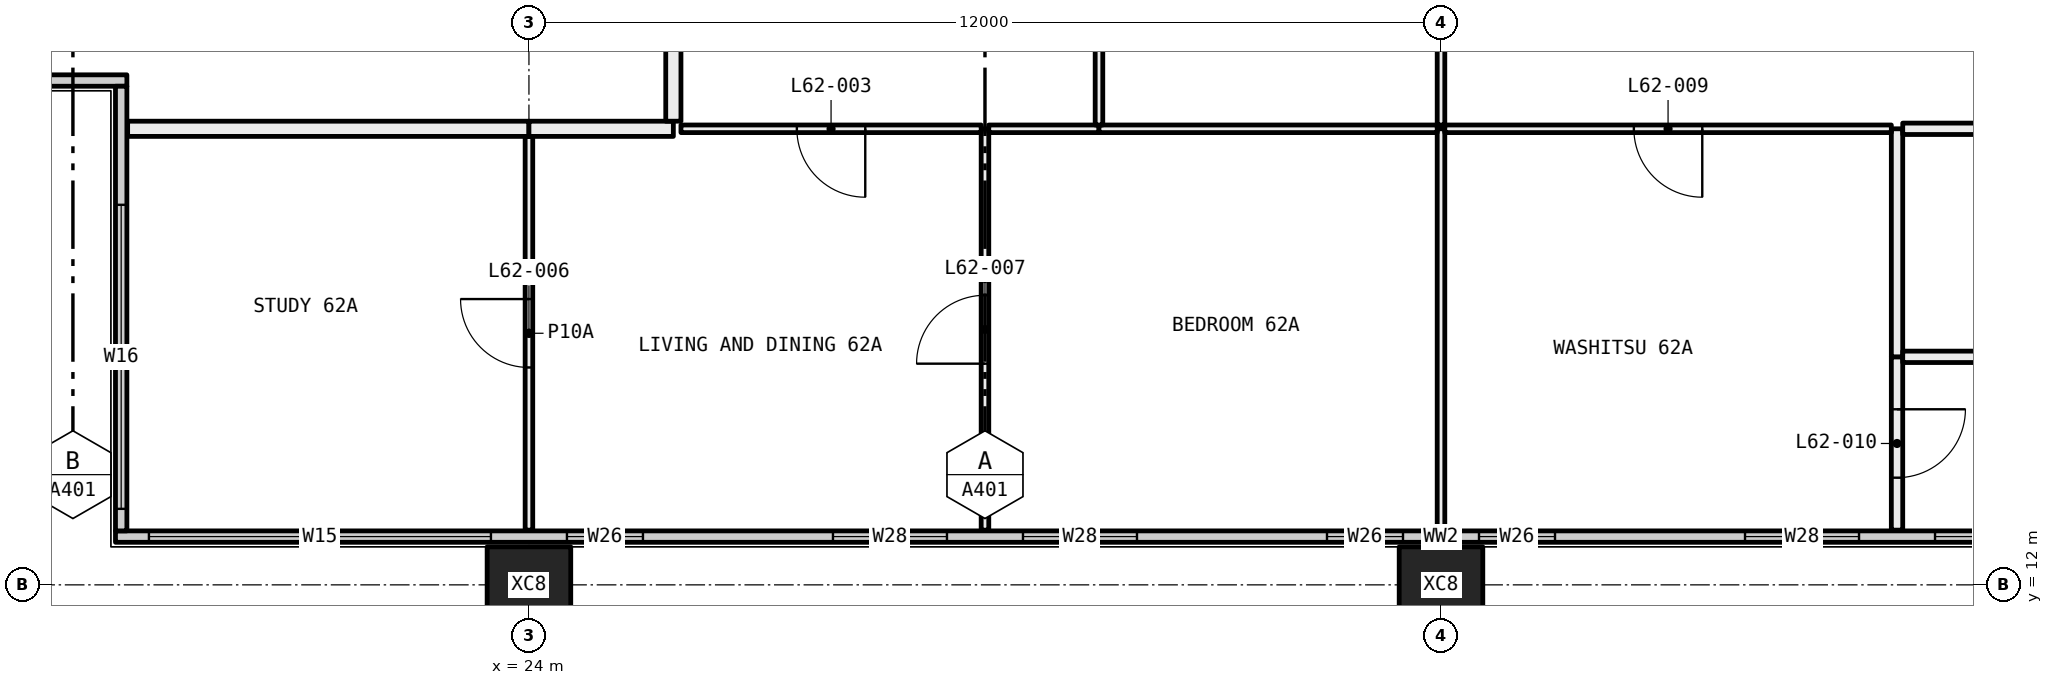
"""IFC4 building model, lengths in metres.
Left out: names, types, materials, properties, quantities, classifications, styles, units other than length and angle.
Written with IfcOpenShell. Run it as: python <this file> out.ifc"""

import sys

from ifc_helpers import new_model, si_unit, direction, frame, frame_2d, origin, origin_2d, place, context, subcontext, project, spatial, rectangle, hollow_rectangle, extrude, element, fill, save


model = new_model("IFC4")
c1 = context("Model", 3, precision=1e-05, world=origin(), true_north=direction((0.0, 1.0)))
c2 = subcontext(c1, "Body", "Model", "MODEL_VIEW")
j1 = project(units=[si_unit("LENGTHUNIT", "METRE"), si_unit("PLANEANGLEUNIT", "RADIAN")], contexts=[c1])
p1 = place(None, origin())
s1 = spatial("IfcSite", under=j1, at=p1, CompositionType="ELEMENT")
p2 = place(p1, origin())
s2 = spatial("IfcBuilding", under=s1, at=p2, CompositionType="ELEMENT")
p3 = place(p2, frame((0.0, 0.0, 231.75)))
s3 = spatial("IfcBuildingStorey", under=s2, at=p3, CompositionType="ELEMENT", Elevation=231.75)
for number, where, z_axis, x_axis in (
    (1, (24.0, 12.0, -0.4), (0.0, 0.0, 1.0), (1.0, 0.0, 0.0)),
    (2, (36.0, 12.0, -0.4), (0.0, 0.0, 1.0), (1.0, 0.0, 0.0)),
):
    element("IfcColumn", number, at=place(p3, frame(where, z_axis=z_axis, x_axis=x_axis)), inside=s3, PredefinedType="COLUMN", context=c2, shape_type="SweptSolid", body=[
        extrude(hollow_rectangle(XDim=1.1, YDim=1.0, WallThickness=0.04, at=origin_2d()), origin(), (0.0, 0.0, 1.0), 3.45),
    ])
p4 = place(p3, frame((18.56, 12.635, 0.0), z_axis=(0.0, 0.0, 1.0), x_axis=(1.0, 0.0, 0.0)))
e3 = element("IfcWall", 3, at=p4, inside=s3, PredefinedType="ELEMENTEDWALL", context=c2, shape_type="SweptSolid", body=[
    extrude(rectangle(XDim=34.88, YDim=0.15, at=frame_2d((17.44, 0.0))), origin(), (0.0, 0.0, 1.0), 3.05),
])
p5 = place(p4, frame((0.44, 0.0, 0.45)))
e4 = element("IfcOpeningElement", 4, at=p5, cuts=e3, PredefinedType="OPENING", context=c2, shape_type="SweptSolid", body=[
    extrude(rectangle(XDim=4.5, YDim=2.55, at=frame_2d((2.25, 1.275))), frame((0.0, 0.085, 0.0), z_axis=(0.0, -1.0, 0.0), x_axis=(1.0, 0.0, 0.0)), (0.0, 0.0, 1.0), 0.17),
])
p6 = place(p4, frame((5.94, 0.0, 0.45)))
e5 = element("IfcOpeningElement", 5, at=p6, cuts=e3, PredefinedType="OPENING", context=c2, shape_type="SweptSolid", body=[
    extrude(rectangle(XDim=1.0, YDim=2.55, at=frame_2d((0.5, 1.275))), frame((0.0, 0.085, 0.0), z_axis=(0.0, -1.0, 0.0), x_axis=(1.0, 0.0, 0.0)), (0.0, 0.0, 1.0), 0.17),
])
p7 = place(p4, frame((9.44, 0.0, 0.45)))
e6 = element("IfcOpeningElement", 6, at=p7, cuts=e3, PredefinedType="OPENING", context=c2, shape_type="SweptSolid", body=[
    extrude(rectangle(XDim=1.5, YDim=2.55, at=frame_2d((0.75, 1.275))), frame((0.0, 0.085, 0.0), z_axis=(0.0, -1.0, 0.0), x_axis=(1.0, 0.0, 0.0)), (0.0, 0.0, 1.0), 0.17),
])
p8 = place(p4, frame((11.94, 0.0, 0.45)))
e7 = element("IfcOpeningElement", 7, at=p8, cuts=e3, PredefinedType="OPENING", context=c2, shape_type="SweptSolid", body=[
    extrude(rectangle(XDim=1.5, YDim=2.55, at=frame_2d((0.75, 1.275))), frame((0.0, 0.085, 0.0), z_axis=(0.0, -1.0, 0.0), x_axis=(1.0, 0.0, 0.0)), (0.0, 0.0, 1.0), 0.17),
])
p9 = place(p4, frame((15.94, 0.0, 0.45)))
e8 = element("IfcOpeningElement", 8, at=p9, cuts=e3, PredefinedType="OPENING", context=c2, shape_type="SweptSolid", body=[
    extrude(rectangle(XDim=1.0, YDim=2.55, at=frame_2d((0.5, 1.275))), frame((0.0, 0.085, 0.0), z_axis=(0.0, -1.0, 0.0), x_axis=(1.0, 0.0, 0.0)), (0.0, 0.0, 1.0), 0.17),
])
p10 = place(p4, frame((17.94, 0.0, 0.45)))
e9 = element("IfcOpeningElement", 9, at=p10, cuts=e3, PredefinedType="OPENING", context=c2, shape_type="SweptSolid", body=[
    extrude(rectangle(XDim=1.0, YDim=2.55, at=frame_2d((0.5, 1.275))), frame((0.0, 0.085, 0.0), z_axis=(0.0, -1.0, 0.0), x_axis=(1.0, 0.0, 0.0)), (0.0, 0.0, 1.0), 0.17),
])
p11 = place(p4, frame((21.44, 0.0, 0.45)))
e10 = element("IfcOpeningElement", 10, at=p11, cuts=e3, PredefinedType="OPENING", context=c2, shape_type="SweptSolid", body=[
    extrude(rectangle(XDim=1.5, YDim=2.55, at=frame_2d((0.75, 1.275))), frame((0.0, 0.085, 0.0), z_axis=(0.0, -1.0, 0.0), x_axis=(1.0, 0.0, 0.0)), (0.0, 0.0, 1.0), 0.17),
])
p12 = place(p4, frame((23.94, 0.0, 0.45)))
e11 = element("IfcOpeningElement", 11, at=p12, cuts=e3, PredefinedType="OPENING", context=c2, shape_type="SweptSolid", body=[
    extrude(rectangle(XDim=1.5, YDim=2.55, at=frame_2d((0.75, 1.275))), frame((0.0, 0.085, 0.0), z_axis=(0.0, -1.0, 0.0), x_axis=(1.0, 0.0, 0.0)), (0.0, 0.0, 1.0), 0.17),
])
p13 = place(p4, frame((27.94, 0.0, 0.45)))
e12 = element("IfcOpeningElement", 12, at=p13, cuts=e3, PredefinedType="OPENING", context=c2, shape_type="SweptSolid", body=[
    extrude(rectangle(XDim=1.0, YDim=2.55, at=frame_2d((0.5, 1.275))), frame((0.0, 0.085, 0.0), z_axis=(0.0, -1.0, 0.0), x_axis=(1.0, 0.0, 0.0)), (0.0, 0.0, 1.0), 0.17),
])
p14 = place(p4, frame((29.94, 0.0, 0.45)))
e13 = element("IfcOpeningElement", 13, at=p14, cuts=e3, PredefinedType="OPENING", context=c2, shape_type="SweptSolid", body=[
    extrude(rectangle(XDim=4.5, YDim=2.55, at=frame_2d((2.25, 1.275))), frame((0.0, 0.085, 0.0), z_axis=(0.0, -1.0, 0.0), x_axis=(1.0, 0.0, 0.0)), (0.0, 0.0, 1.0), 0.17),
])
p15 = place(p3, frame((12.56, 18.635, 0.0), z_axis=(0.0, 0.0, 1.0), x_axis=(1.0, 0.0, 0.0)))
e14 = element("IfcWall", 14, at=p15, inside=s3, PredefinedType="ELEMENTEDWALL", context=c2, shape_type="SweptSolid", body=[
    extrude(rectangle(XDim=6.15, YDim=0.15, at=frame_2d((3.075, 0.0))), origin(), (0.0, 0.0, 1.0), 3.05),
])
p16 = place(p15, frame((0.44, 0.0, 0.45)))
e15 = element("IfcOpeningElement", 15, at=p16, cuts=e14, PredefinedType="OPENING", context=c2, shape_type="SweptSolid", body=[
    extrude(rectangle(XDim=4.0, YDim=2.55, at=frame_2d((2.0, 1.275))), frame((0.0, 0.085, 0.0), z_axis=(0.0, -1.0, 0.0), x_axis=(1.0, 0.0, 0.0)), (0.0, 0.0, 1.0), 0.17),
])
p17 = place(p3, frame((18.635, 12.71, 0.0), z_axis=(0.0, 0.0, 1.0), x_axis=(0.0, 1.0, 0.0)))
e16 = element("IfcWall", 16, at=p17, inside=s3, PredefinedType="ELEMENTEDWALL", context=c2, shape_type="SweptSolid", body=[
    extrude(rectangle(XDim=5.85, YDim=0.15, at=frame_2d((2.925, 0.0))), origin(), (0.0, 0.0, 1.0), 3.05),
])
p18 = place(p17, frame((0.29, 0.0, 0.45)))
e17 = element("IfcOpeningElement", 17, at=p18, cuts=e16, PredefinedType="OPENING", context=c2, shape_type="SweptSolid", body=[
    extrude(rectangle(XDim=4.0, YDim=2.55, at=frame_2d((2.0, 1.275))), frame((0.0, 0.085, 0.0), z_axis=(0.0, -1.0, 0.0), x_axis=(1.0, 0.0, 0.0)), (0.0, 0.0, 1.0), 0.17),
])
p19 = place(p3, frame((24.0, 12.72, 0.0), z_axis=(0.0, 0.0, 1.0), x_axis=(0.0, 1.0, 0.0)))
e18 = element("IfcWall", 18, at=p19, inside=s3, PredefinedType="PARTITIONING", context=c2, shape_type="SweptSolid", body=[
    extrude(rectangle(XDim=5.18, YDim=0.1, at=frame_2d((2.59, 0.0))), origin(), (0.0, 0.0, 1.0), 3.05),
])
p20 = place(p19, frame((2.14, 0.0, 0.0)))
e19 = element("IfcOpeningElement", 19, at=p20, cuts=e18, PredefinedType="OPENING", context=c2, shape_type="SweptSolid", body=[
    extrude(rectangle(XDim=0.9, YDim=2.1, at=frame_2d((0.45, 1.05))), frame((0.0, 0.06, 0.0), z_axis=(0.0, -1.0, 0.0), x_axis=(1.0, 0.0, 0.0)), (0.0, 0.0, 1.0), 0.12),
])
p21 = place(p3, frame((24.0, 18.0, 0.0), z_axis=(0.0, 0.0, 1.0), x_axis=(-1.0, 0.0, 0.0)))
e20 = element("IfcWall", 20, at=p21, inside=s3, PredefinedType="PARTITIONING", context=c2, shape_type="SweptSolid", body=[
    extrude(rectangle(XDim=5.28, YDim=0.2, at=frame_2d((2.64, 0.0))), origin(), (0.0, 0.0, 1.0), 3.05),
])
p22 = place(p3, frame((30.0, 12.72, 0.0), z_axis=(0.0, 0.0, 1.0), x_axis=(0.0, 1.0, 0.0)))
e21 = element("IfcWall", 21, at=p22, inside=s3, PredefinedType="PARTITIONING", context=c2, shape_type="SweptSolid", body=[
    extrude(rectangle(XDim=5.28, YDim=0.1, at=frame_2d((2.64, 0.0))), origin(), (0.0, 0.0, 1.0), 3.05),
])
p23 = place(p22, frame((2.19, 0.0, 0.0)))
e22 = element("IfcOpeningElement", 22, at=p23, cuts=e21, PredefinedType="OPENING", context=c2, shape_type="SweptSolid", body=[
    extrude(rectangle(XDim=0.9, YDim=2.1, at=frame_2d((0.45, 1.05))), frame((0.0, 0.06, 0.0), z_axis=(0.0, -1.0, 0.0), x_axis=(1.0, 0.0, 0.0)), (0.0, 0.0, 1.0), 0.12),
])
p24 = place(p3, frame((29.95, 18.0, 0.0), z_axis=(0.0, 0.0, 1.0), x_axis=(-1.0, 0.0, 0.0)))
e23 = element("IfcWall", 23, at=p24, inside=s3, PredefinedType="PARTITIONING", context=c2, shape_type="SweptSolid", body=[
    extrude(rectangle(XDim=3.95, YDim=0.1, at=frame_2d((1.975, 0.0))), origin(), (0.0, 0.0, 1.0), 3.05),
])
p25 = place(p24, frame((1.525, 0.0, 0.0)))
e24 = element("IfcOpeningElement", 24, at=p25, cuts=e23, PredefinedType="OPENING", context=c2, shape_type="SweptSolid", body=[
    extrude(rectangle(XDim=0.9, YDim=2.1, at=frame_2d((0.45, 1.05))), frame((0.0, 0.06, 0.0), z_axis=(0.0, -1.0, 0.0), x_axis=(1.0, 0.0, 0.0)), (0.0, 0.0, 1.0), 0.12),
])
p26 = place(p3, frame((25.9, 18.0, 0.0), z_axis=(0.0, 0.0, 1.0), x_axis=(-1.0, 0.0, 0.0)))
e25 = element("IfcWall", 25, at=p26, inside=s3, PredefinedType="PARTITIONING", context=c2, shape_type="SweptSolid", body=[
    extrude(rectangle(XDim=1.9, YDim=0.2, at=frame_2d((0.95, 0.0))), origin(), (0.0, 0.0, 1.0), 3.05),
])
p27 = place(p3, frame((36.0, 12.72, 0.0), z_axis=(0.0, 0.0, 1.0), x_axis=(0.0, 1.0, 0.0)))
e26 = element("IfcWall", 26, at=p27, inside=s3, PredefinedType="PARTITIONING", context=c2, shape_type="SweptSolid", body=[
    extrude(rectangle(XDim=5.28, YDim=0.1, at=frame_2d((2.64, 0.0))), origin(), (0.0, 0.0, 1.0), 2.45),
])
p28 = place(p3, frame((31.5, 18.0, 0.0), z_axis=(0.0, 0.0, 1.0), x_axis=(-1.0, 0.0, 0.0)))
e27 = element("IfcWall", 27, at=p28, inside=s3, PredefinedType="PARTITIONING", context=c2, shape_type="SweptSolid", body=[
    extrude(rectangle(XDim=1.45, YDim=0.1, at=frame_2d((0.725, 0.0))), origin(), (0.0, 0.0, 1.0), 3.05),
])
p29 = place(p3, frame((35.95, 18.0, 0.0), z_axis=(0.0, 0.0, 1.0), x_axis=(-1.0, 0.0, 0.0)))
e28 = element("IfcWall", 28, at=p29, inside=s3, PredefinedType="PARTITIONING", context=c2, shape_type="SweptSolid", body=[
    extrude(rectangle(XDim=4.45, YDim=0.1, at=frame_2d((2.225, 0.0))), origin(), (0.0, 0.0, 1.0), 2.45),
])
p30 = place(p3, frame((42.0, 12.72, 0.0), z_axis=(0.0, 0.0, 1.0), x_axis=(0.0, 1.0, 0.0)))
e29 = element("IfcWall", 29, at=p30, inside=s3, PredefinedType="PARTITIONING", context=c2, shape_type="SweptSolid", body=[
    extrude(rectangle(XDim=2.28, YDim=0.15, at=frame_2d((1.14, 0.0))), origin(), (0.0, 0.0, 1.0), 3.05),
])
p31 = place(p30, frame((0.69, 0.0, 0.0)))
e30 = element("IfcOpeningElement", 30, at=p31, cuts=e29, PredefinedType="OPENING", context=c2, shape_type="SweptSolid", body=[
    extrude(rectangle(XDim=0.9, YDim=2.1, at=frame_2d((0.45, 1.05))), frame((0.0, 0.085, 0.0), z_axis=(0.0, -1.0, 0.0), x_axis=(1.0, 0.0, 0.0)), (0.0, 0.0, 1.0), 0.17),
])
p32 = place(p3, frame((42.0, 15.0, 0.0), z_axis=(0.0, 0.0, 1.0), x_axis=(0.0, 1.0, 0.0)))
e31 = element("IfcWall", 31, at=p32, inside=s3, PredefinedType="PARTITIONING", context=c2, shape_type="SweptSolid", body=[
    extrude(rectangle(XDim=3.0, YDim=0.15, at=frame_2d((1.5, 0.0))), origin(), (0.0, 0.0, 1.0), 3.05),
])
p33 = place(p3, frame((41.925, 18.0, 0.0), z_axis=(0.0, 0.0, 1.0), x_axis=(-1.0, 0.0, 0.0)))
e32 = element("IfcWall", 32, at=p33, inside=s3, PredefinedType="PARTITIONING", context=c2, shape_type="SweptSolid", body=[
    extrude(rectangle(XDim=5.875, YDim=0.1, at=frame_2d((2.938, 0.0))), origin(), (0.0, 0.0, 1.0), 2.45),
])
p34 = place(p33, frame((2.488, 0.0, 0.0)))
e33 = element("IfcOpeningElement", 33, at=p34, cuts=e32, PredefinedType="OPENING", context=c2, shape_type="SweptSolid", body=[
    extrude(rectangle(XDim=0.9, YDim=2.1, at=frame_2d((0.45, 1.05))), frame((0.0, 0.06, 0.0), z_axis=(0.0, -1.0, 0.0), x_axis=(1.0, 0.0, 0.0)), (0.0, 0.0, 1.0), 0.12),
])
p35 = place(p3, frame((47.9, 15.0, 0.0), z_axis=(0.0, 0.0, 1.0), x_axis=(-1.0, 0.0, 0.0)))
e34 = element("IfcWall", 34, at=p35, inside=s3, PredefinedType="PARTITIONING", context=c2, shape_type="SweptSolid", body=[
    extrude(rectangle(XDim=5.825, YDim=0.15, at=frame_2d((2.913, 0.0))), origin(), (0.0, 0.0, 1.0), 3.05),
])
p36 = place(p3, frame((46.0, 18.0, 0.0), z_axis=(0.0, 0.0, 1.0), x_axis=(-1.0, 0.0, 0.0)))
e35 = element("IfcWall", 35, at=p36, inside=s3, PredefinedType="PARTITIONING", context=c2, shape_type="SweptSolid", body=[
    extrude(rectangle(XDim=3.925, YDim=0.15, at=frame_2d((1.962, 0.0))), origin(), (0.0, 0.0, 1.0), 3.05),
])
p37 = place(p36, frame((1.512, 0.0, 0.0)))
e36 = element("IfcOpeningElement", 36, at=p37, cuts=e35, PredefinedType="OPENING", context=c2, shape_type="SweptSolid", body=[
    extrude(rectangle(XDim=0.9, YDim=2.1, at=frame_2d((0.45, 1.05))), frame((0.0, 0.085, 0.0), z_axis=(0.0, -1.0, 0.0), x_axis=(1.0, 0.0, 0.0)), (0.0, 0.0, 1.0), 0.17),
])
p38 = place(p3, frame((31.5, 18.05, 0.0), z_axis=(0.0, 0.0, 1.0), x_axis=(0.0, 1.0, 0.0)))
e37 = element("IfcWall", 37, at=p38, inside=s3, PredefinedType="PARTITIONING", context=c2, shape_type="SweptSolid", body=[
    extrude(rectangle(XDim=6.175, YDim=0.1, at=frame_2d((3.087, 0.0))), origin(), (0.0, 0.0, 1.0), 2.45),
])
p39 = place(p38, frame((2.637, 0.0, 0.0)))
e38 = element("IfcOpeningElement", 38, at=p39, cuts=e37, PredefinedType="OPENING", context=c2, shape_type="SweptSolid", body=[
    extrude(rectangle(XDim=0.9, YDim=2.1, at=frame_2d((0.45, 1.05))), frame((0.0, 0.06, 0.0), z_axis=(0.0, -1.0, 0.0), x_axis=(1.0, 0.0, 0.0)), (0.0, 0.0, 1.0), 0.12),
])
p40 = place(p3, frame((25.9, 23.9, 0.0), z_axis=(0.0, 0.0, 1.0), x_axis=(0.0, -1.0, 0.0)))
e39 = element("IfcWall", 39, at=p40, inside=s3, PredefinedType="PARTITIONING", context=c2, shape_type="SweptSolid", body=[
    extrude(rectangle(XDim=5.8, YDim=0.2, at=frame_2d((2.9, 0.0))), origin(), (0.0, 0.0, 1.0), 3.05),
])
p41 = place(p3, frame((36.0, 18.05, 0.0), z_axis=(0.0, 0.0, 1.0), x_axis=(0.0, 1.0, 0.0)))
e40 = element("IfcWall", 40, at=p41, inside=s3, PredefinedType="PARTITIONING", context=c2, shape_type="SweptSolid", body=[
    extrude(rectangle(XDim=5.4, YDim=0.1, at=frame_2d((2.7, 0.0))), origin(), (0.0, 0.0, 1.0), 2.45),
])
p42 = place(p41, frame((2.25, 0.0, 0.0)))
e41 = element("IfcOpeningElement", 41, at=p42, cuts=e40, PredefinedType="OPENING", context=c2, shape_type="SweptSolid", body=[
    extrude(rectangle(XDim=0.9, YDim=2.1, at=frame_2d((0.45, 1.05))), frame((0.0, 0.06, 0.0), z_axis=(0.0, -1.0, 0.0), x_axis=(1.0, 0.0, 0.0)), (0.0, 0.0, 1.0), 0.12),
])
p43 = place(p5, origin())
e42 = element("IfcWindow", 42, at=p43, inside=s3, PartitioningType="SINGLE_PANEL", PredefinedType="WINDOW", context=c2, shape_type="SweptSolid", body=[
    extrude(rectangle(XDim=4.5, YDim=2.55, at=frame_2d((2.25, 1.275))), frame((0.0, 0.03, 0.0), z_axis=(0.0, -1.0, 0.0), x_axis=(1.0, 0.0, 0.0)), (0.0, 0.0, 1.0), 0.06),
])
fill(e4, e42)
p44 = place(p6, origin())
e43 = element("IfcWindow", 43, at=p44, inside=s3, PartitioningType="SINGLE_PANEL", PredefinedType="WINDOW", context=c2, shape_type="SweptSolid", body=[
    extrude(rectangle(XDim=1.0, YDim=2.55, at=frame_2d((0.5, 1.275))), frame((0.0, 0.03, 0.0), z_axis=(0.0, -1.0, 0.0), x_axis=(1.0, 0.0, 0.0)), (0.0, 0.0, 1.0), 0.06),
])
fill(e5, e43)
p45 = place(p7, origin())
e44 = element("IfcWindow", 44, at=p45, inside=s3, PartitioningType="SINGLE_PANEL", PredefinedType="WINDOW", context=c2, shape_type="SweptSolid", body=[
    extrude(rectangle(XDim=1.5, YDim=2.55, at=frame_2d((0.75, 1.275))), frame((0.0, 0.03, 0.0), z_axis=(0.0, -1.0, 0.0), x_axis=(1.0, 0.0, 0.0)), (0.0, 0.0, 1.0), 0.06),
])
fill(e6, e44)
p46 = place(p8, origin())
e45 = element("IfcWindow", 45, at=p46, inside=s3, PartitioningType="SINGLE_PANEL", PredefinedType="WINDOW", context=c2, shape_type="SweptSolid", body=[
    extrude(rectangle(XDim=1.5, YDim=2.55, at=frame_2d((0.75, 1.275))), frame((0.0, 0.03, 0.0), z_axis=(0.0, -1.0, 0.0), x_axis=(1.0, 0.0, 0.0)), (0.0, 0.0, 1.0), 0.06),
])
fill(e7, e45)
p47 = place(p9, origin())
e46 = element("IfcWindow", 46, at=p47, inside=s3, PartitioningType="SINGLE_PANEL", PredefinedType="WINDOW", context=c2, shape_type="SweptSolid", body=[
    extrude(rectangle(XDim=1.0, YDim=2.55, at=frame_2d((0.5, 1.275))), frame((0.0, 0.03, 0.0), z_axis=(0.0, -1.0, 0.0), x_axis=(1.0, 0.0, 0.0)), (0.0, 0.0, 1.0), 0.06),
])
fill(e8, e46)
p48 = place(p10, origin())
e47 = element("IfcWindow", 47, at=p48, inside=s3, PartitioningType="SINGLE_PANEL", PredefinedType="WINDOW", context=c2, shape_type="SweptSolid", body=[
    extrude(rectangle(XDim=1.0, YDim=2.55, at=frame_2d((0.5, 1.275))), frame((0.0, 0.03, 0.0), z_axis=(0.0, -1.0, 0.0), x_axis=(1.0, 0.0, 0.0)), (0.0, 0.0, 1.0), 0.06),
])
fill(e9, e47)
p49 = place(p11, origin())
e48 = element("IfcWindow", 48, at=p49, inside=s3, PartitioningType="SINGLE_PANEL", PredefinedType="WINDOW", context=c2, shape_type="SweptSolid", body=[
    extrude(rectangle(XDim=1.5, YDim=2.55, at=frame_2d((0.75, 1.275))), frame((0.0, 0.03, 0.0), z_axis=(0.0, -1.0, 0.0), x_axis=(1.0, 0.0, 0.0)), (0.0, 0.0, 1.0), 0.06),
])
fill(e10, e48)
p50 = place(p12, origin())
e49 = element("IfcWindow", 49, at=p50, inside=s3, PartitioningType="SINGLE_PANEL", PredefinedType="WINDOW", context=c2, shape_type="SweptSolid", body=[
    extrude(rectangle(XDim=1.5, YDim=2.55, at=frame_2d((0.75, 1.275))), frame((0.0, 0.03, 0.0), z_axis=(0.0, -1.0, 0.0), x_axis=(1.0, 0.0, 0.0)), (0.0, 0.0, 1.0), 0.06),
])
fill(e11, e49)
p51 = place(p18, origin())
e50 = element("IfcWindow", 50, at=p51, inside=s3, PartitioningType="SINGLE_PANEL", PredefinedType="WINDOW", context=c2, shape_type="SweptSolid", body=[
    extrude(rectangle(XDim=4.0, YDim=2.55, at=frame_2d((2.0, 1.275))), frame((0.0, 0.03, 0.0), z_axis=(0.0, -1.0, 0.0), x_axis=(1.0, 0.0, 0.0)), (0.0, 0.0, 1.0), 0.06),
])
fill(e17, e50)
p52 = place(p25, origin())
e51 = element("IfcDoor", 51, at=p52, inside=s3, OperationType="SINGLE_SWING_RIGHT", PredefinedType="DOOR", context=c2, shape_type="SweptSolid", body=[
    extrude(rectangle(XDim=0.9, YDim=2.1, at=frame_2d((0.45, 1.05))), frame((0.0, 0.025, 0.0), z_axis=(0.0, -1.0, 0.0), x_axis=(1.0, 0.0, 0.0)), (0.0, 0.0, 1.0), 0.05),
])
fill(e24, e51)
p53 = place(p20, origin())
e52 = element("IfcDoor", 52, at=p53, inside=s3, OperationType="SINGLE_SWING_LEFT", PredefinedType="DOOR", context=c2, shape_type="SweptSolid", body=[
    extrude(rectangle(XDim=0.9, YDim=2.1, at=frame_2d((0.45, 1.05))), frame((0.0, 0.025, 0.0), z_axis=(0.0, -1.0, 0.0), x_axis=(1.0, 0.0, 0.0)), (0.0, 0.0, 1.0), 0.05),
])
fill(e19, e52)
p54 = place(p23, origin())
e53 = element("IfcDoor", 53, at=p54, inside=s3, OperationType="SINGLE_SWING_RIGHT", PredefinedType="DOOR", context=c2, shape_type="SweptSolid", body=[
    extrude(rectangle(XDim=0.9, YDim=2.1, at=frame_2d((0.45, 1.05))), frame((0.0, 0.025, 0.0), z_axis=(0.0, -1.0, 0.0), x_axis=(1.0, 0.0, 0.0)), (0.0, 0.0, 1.0), 0.05),
])
fill(e22, e53)
p55 = place(p34, origin())
e54 = element("IfcDoor", 54, at=p55, inside=s3, OperationType="SINGLE_SWING_RIGHT", PredefinedType="DOOR", context=c2, shape_type="SweptSolid", body=[
    extrude(rectangle(XDim=0.9, YDim=2.1, at=frame_2d((0.45, 1.05))), frame((0.0, 0.025, 0.0), z_axis=(0.0, -1.0, 0.0), x_axis=(1.0, 0.0, 0.0)), (0.0, 0.0, 1.0), 0.05),
])
fill(e33, e54)
p56 = place(p31, frame((0.9, 0.0, 0.0), x_axis=(-1.0, 0.0, 0.0)))
e55 = element("IfcDoor", 55, at=p56, inside=s3, OperationType="SINGLE_SWING_RIGHT", PredefinedType="DOOR", context=c2, shape_type="SweptSolid", body=[
    extrude(rectangle(XDim=0.9, YDim=2.1, at=frame_2d((0.45, 1.05))), frame((0.0, 0.025, 0.0), z_axis=(0.0, -1.0, 0.0), x_axis=(1.0, 0.0, 0.0)), (0.0, 0.0, 1.0), 0.05),
])
fill(e30, e55)
save(model, sys.argv[1])
